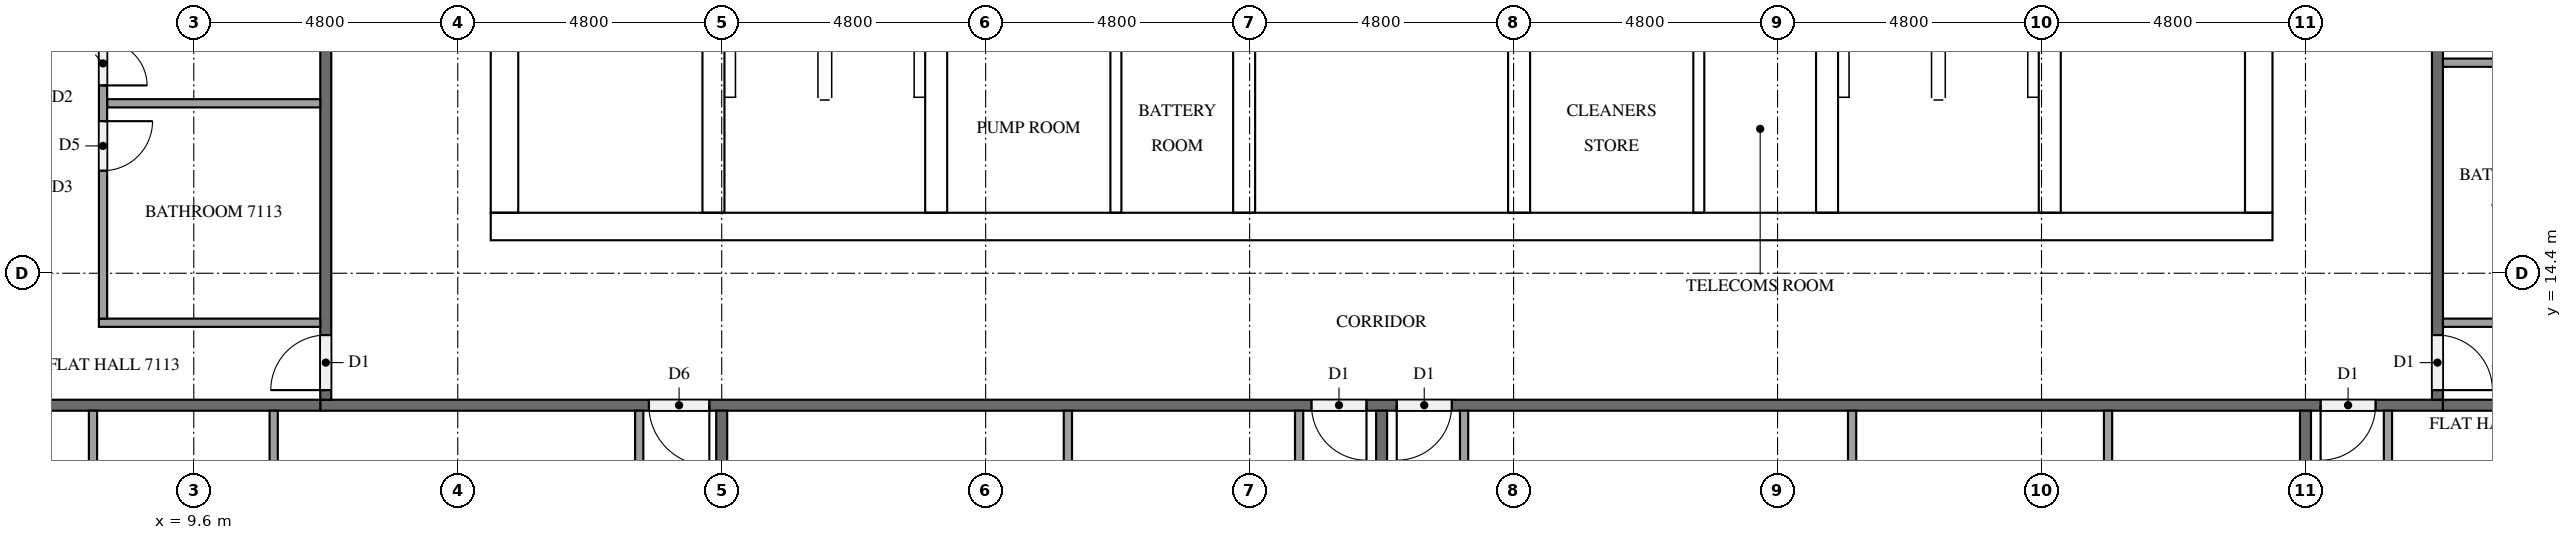
"""IFC4 building model, lengths in metres.
Left out: names, types, materials, properties, quantities, classifications, styles, units other than length and angle.
Written with IfcOpenShell. Run it as: python <this file> out.ifc"""

import sys

from ifc_helpers import new_model, si_unit, direction, frame, frame_2d, origin, place, context, subcontext, project, spatial, rectangle, extrude, element, fill, save


model = new_model("IFC4")
c1 = context("Model", 3, precision=1e-05, world=origin(), true_north=direction((0.0, 1.0)))
c2 = subcontext(c1, "Body", "Model", "MODEL_VIEW")
j1 = project(units=[si_unit("LENGTHUNIT", "METRE"), si_unit("PLANEANGLEUNIT", "RADIAN")], contexts=[c1])
p1 = place(None, origin())
s1 = spatial("IfcSite", under=j1, at=p1, CompositionType="ELEMENT")
p2 = place(p1, origin())
s2 = spatial("IfcBuilding", under=s1, at=p2, CompositionType="ELEMENT")
p3 = place(p2, frame((0.0, 0.0, 272.1)))
s3 = spatial("IfcBuildingStorey", under=s2, at=p3, CompositionType="ELEMENT", Elevation=272.1)
p4 = place(p3, frame((15.0, 15.25, 0.0), z_axis=(0.0, 0.0, 1.0), x_axis=(1.0, 0.0, 0.0)))
e1 = element("IfcWall", 1, at=p4, inside=s3, PredefinedType="SHEAR", context=c2, shape_type="SweptSolid", body=[
    extrude(rectangle(XDim=32.4, YDim=0.5, at=frame_2d((16.2, 0.0))), origin(), (0.0, 0.0, 1.0), 3.2),
])
p5 = place(p4, frame((15.3, 0.0, 0.0)))
e2 = element("IfcOpeningElement", 2, at=p5, cuts=e1, PredefinedType="OPENING", context=c2, shape_type="SweptSolid", body=[
    extrude(rectangle(XDim=1.8, YDim=2.1, at=frame_2d((0.9, 1.05))), frame((0.0, 0.26, 0.0), z_axis=(0.0, -1.0, 0.0), x_axis=(1.0, 0.0, 0.0)), (0.0, 0.0, 1.0), 0.52),
])
p6 = place(p3, frame((15.25, 15.5, 0.0), z_axis=(0.0, 0.0, 1.0), x_axis=(0.0, 1.0, 0.0)))
e3 = element("IfcWall", 3, at=p6, inside=s3, PredefinedType="SHEAR", context=c2, shape_type="SweptSolid", body=[
    extrude(rectangle(XDim=21.8, YDim=0.5, at=frame_2d((10.9, 0.0))), origin(), (0.0, 0.0, 1.0), 3.2),
])
p7 = place(p6, frame((5.26, 0.0, 0.0)))
e4 = element("IfcOpeningElement", 4, at=p7, cuts=e3, PredefinedType="OPENING", context=c2, shape_type="SweptSolid", body=[
    extrude(rectangle(XDim=1.2, YDim=2.1, at=frame_2d((0.6, 1.05))), frame((0.0, 0.26, 0.0), z_axis=(0.0, -1.0, 0.0), x_axis=(1.0, 0.0, 0.0)), (0.0, 0.0, 1.0), 0.52),
])
p8 = place(p3, frame((47.15, 15.5, 0.0), z_axis=(0.0, 0.0, 1.0), x_axis=(0.0, 1.0, 0.0)))
e5 = element("IfcWall", 5, at=p8, inside=s3, PredefinedType="SHEAR", context=c2, shape_type="SweptSolid", body=[
    extrude(rectangle(XDim=21.8, YDim=0.5, at=frame_2d((10.9, 0.0))), origin(), (0.0, 0.0, 1.0), 3.2),
])
p9 = place(p8, frame((10.6, 0.0, 0.0)))
e6 = element("IfcOpeningElement", 6, at=p9, cuts=e5, PredefinedType="OPENING", context=c2, shape_type="SweptSolid", body=[
    extrude(rectangle(XDim=1.2, YDim=2.1, at=frame_2d((0.6, 1.05))), frame((0.0, 0.26, 0.0), z_axis=(0.0, -1.0, 0.0), x_axis=(1.0, 0.0, 0.0)), (0.0, 0.0, 1.0), 0.52),
])
p10 = place(p3, frame((19.05, 15.5, 0.0), z_axis=(0.0, 0.0, 1.0), x_axis=(0.0, 1.0, 0.0)))
e7 = element("IfcWall", 7, at=p10, inside=s3, PredefinedType="SHEAR", context=c2, shape_type="SweptSolid", body=[
    extrude(rectangle(XDim=15.55, YDim=0.4, at=frame_2d((7.775, 0.0))), origin(), (0.0, 0.0, 1.0), 3.2),
])
p11 = place(p10, frame((9.95, 0.0, 0.0)))
e8 = element("IfcOpeningElement", 8, at=p11, cuts=e7, PredefinedType="OPENING", context=c2, shape_type="SweptSolid", body=[
    extrude(rectangle(XDim=1.1, YDim=2.1, at=frame_2d((0.55, 1.05))), frame((0.0, 0.21, 0.0), z_axis=(0.0, -1.0, 0.0), x_axis=(1.0, 0.0, 0.0)), (0.0, 0.0, 1.0), 0.42),
])
p12 = place(p10, frame((13.45, 0.0, 0.0)))
e9 = element("IfcOpeningElement", 9, at=p12, cuts=e7, PredefinedType="OPENING", context=c2, shape_type="SweptSolid", body=[
    extrude(rectangle(XDim=1.1, YDim=2.1, at=frame_2d((0.55, 1.05))), frame((0.0, 0.21, 0.0), z_axis=(0.0, -1.0, 0.0), x_axis=(1.0, 0.0, 0.0)), (0.0, 0.0, 1.0), 0.42),
])
p13 = place(p10, frame((0.7, 0.0, 0.0)))
e10 = element("IfcOpeningElement", 10, at=p13, cuts=e7, PredefinedType="OPENING", context=c2, shape_type="SweptSolid", body=[
    extrude(rectangle(XDim=1.2, YDim=2.1, at=frame_2d((0.6, 1.05))), frame((0.0, 0.21, 0.0), z_axis=(0.0, -1.0, 0.0), x_axis=(1.0, 0.0, 0.0)), (0.0, 0.0, 1.0), 0.42),
])
p14 = place(p3, frame((23.1, 15.5, 0.0), z_axis=(0.0, 0.0, 1.0), x_axis=(0.0, 1.0, 0.0)))
e11 = element("IfcWall", 11, at=p14, inside=s3, PredefinedType="SHEAR", context=c2, shape_type="SweptSolid", body=[
    extrude(rectangle(XDim=21.8, YDim=0.4, at=frame_2d((10.9, 0.0))), origin(), (0.0, 0.0, 1.0), 3.2),
])
p15 = place(p3, frame((39.3, 15.5, 0.0), z_axis=(0.0, 0.0, 1.0), x_axis=(0.0, 1.0, 0.0)))
e12 = element("IfcWall", 12, at=p15, inside=s3, PredefinedType="SHEAR", context=c2, shape_type="SweptSolid", body=[
    extrude(rectangle(XDim=8.75, YDim=0.4, at=frame_2d((4.375, 0.0))), origin(), (0.0, 0.0, 1.0), 3.2),
])
p16 = place(p3, frame((43.35, 15.5, 0.0), z_axis=(0.0, 0.0, 1.0), x_axis=(0.0, 1.0, 0.0)))
e13 = element("IfcWall", 13, at=p16, inside=s3, PredefinedType="SHEAR", context=c2, shape_type="SweptSolid", body=[
    extrude(rectangle(XDim=8.75, YDim=0.4, at=frame_2d((4.375, 0.0))), origin(), (0.0, 0.0, 1.0), 3.2),
])
p17 = place(p16, frame((0.7, 0.0, 0.0)))
e14 = element("IfcOpeningElement", 14, at=p17, cuts=e13, PredefinedType="OPENING", context=c2, shape_type="SweptSolid", body=[
    extrude(rectangle(XDim=1.2, YDim=2.1, at=frame_2d((0.6, 1.05))), frame((0.0, 0.21, 0.0), z_axis=(0.0, -1.0, 0.0), x_axis=(1.0, 0.0, 0.0)), (0.0, 0.0, 1.0), 0.42),
])
for number, where, z_axis, x_axis in (
    (15, (28.7, 15.5, 0.0), (0.0, 0.0, 1.0), (0.0, 1.0, 0.0)),
    (16, (33.7, 15.5, 0.0), (0.0, 0.0, 1.0), (0.0, 1.0, 0.0)),
):
    element("IfcWall", number, at=place(p3, frame(where, z_axis=z_axis, x_axis=x_axis)), inside=s3, PredefinedType="SHEAR", context=c2, shape_type="SweptSolid", body=[
        extrude(rectangle(XDim=3.05, YDim=0.4, at=frame_2d((1.525, 0.0))), origin(), (0.0, 0.0, 1.0), 3.2),
    ])
for number, where, z_axis, x_axis in (
    (17, (26.368, 15.5, 0.0), (0.0, 0.0, 1.0), (0.0, 1.0, 0.0)),
    (18, (36.968, 15.5, 0.0), (0.0, 0.0, 1.0), (0.0, 1.0, 0.0)),
):
    element("IfcWall", number, at=place(p3, frame(where, z_axis=z_axis, x_axis=x_axis)), inside=s3, PredefinedType="PARTITIONING", context=c2, shape_type="SweptSolid", body=[
        extrude(rectangle(XDim=3.05, YDim=0.2, at=frame_2d((1.525, 0.0))), origin(), (0.0, 0.0, 1.0), 3.2),
    ])
p18 = place(p3, frame((50.5, 12.0, 0.0), z_axis=(0.0, 0.0, 1.0), x_axis=(-1.0, 0.0, 0.0)))
e19 = element("IfcWall", 19, at=p18, inside=s3, PredefinedType="PARTITIONING", context=c2, shape_type="SweptSolid", body=[
    extrude(rectangle(XDim=38.6, YDim=0.2, at=frame_2d((19.3, 0.0))), origin(), (0.0, 0.0, 1.0), 3.2),
])
p19 = place(p18, frame((31.525, 0.0, 0.0)))
e20 = element("IfcOpeningElement", 20, at=p19, cuts=e19, PredefinedType="OPENING", context=c2, shape_type="SweptSolid", body=[
    extrude(rectangle(XDim=1.1, YDim=2.1, at=frame_2d((0.55, 1.05))), frame((0.0, 0.11, 0.0), z_axis=(0.0, -1.0, 0.0), x_axis=(1.0, 0.0, 0.0)), (0.0, 0.0, 1.0), 0.22),
])
p20 = place(p18, frame((19.575, 0.0, 0.0)))
e21 = element("IfcOpeningElement", 21, at=p20, cuts=e19, PredefinedType="OPENING", context=c2, shape_type="SweptSolid", body=[
    extrude(rectangle(XDim=1.0, YDim=2.1, at=frame_2d((0.5, 1.05))), frame((0.0, 0.11, 0.0), z_axis=(0.0, -1.0, 0.0), x_axis=(1.0, 0.0, 0.0)), (0.0, 0.0, 1.0), 0.22),
])
p21 = place(p18, frame((18.025, 0.0, 0.0)))
e22 = element("IfcOpeningElement", 22, at=p21, cuts=e19, PredefinedType="OPENING", context=c2, shape_type="SweptSolid", body=[
    extrude(rectangle(XDim=1.0, YDim=2.1, at=frame_2d((0.5, 1.05))), frame((0.0, 0.11, 0.0), z_axis=(0.0, -1.0, 0.0), x_axis=(1.0, 0.0, 0.0)), (0.0, 0.0, 1.0), 0.22),
])
p22 = place(p18, frame((1.225, 0.0, 0.0)))
e23 = element("IfcOpeningElement", 23, at=p22, cuts=e19, PredefinedType="OPENING", context=c2, shape_type="SweptSolid", body=[
    extrude(rectangle(XDim=1.0, YDim=2.1, at=frame_2d((0.5, 1.05))), frame((0.0, 0.11, 0.0), z_axis=(0.0, -1.0, 0.0), x_axis=(1.0, 0.0, 0.0)), (0.0, 0.0, 1.0), 0.22),
])
p23 = place(p3, frame((50.4, 40.7, 0.0), z_axis=(0.0, 0.0, 1.0), x_axis=(0.0, -1.0, 0.0)))
e24 = element("IfcWall", 24, at=p23, inside=s3, PredefinedType="PARTITIONING", context=c2, shape_type="SweptSolid", body=[
    extrude(rectangle(XDim=28.6, YDim=0.2, at=frame_2d((14.3, 0.0))), origin(), (0.0, 0.0, 1.0), 3.2),
])
p24 = place(p23, frame((27.425, 0.0, 0.0)))
e25 = element("IfcOpeningElement", 25, at=p24, cuts=e24, PredefinedType="OPENING", context=c2, shape_type="SweptSolid", body=[
    extrude(rectangle(XDim=1.0, YDim=2.1, at=frame_2d((0.5, 1.05))), frame((0.0, 0.11, 0.0), z_axis=(0.0, -1.0, 0.0), x_axis=(1.0, 0.0, 0.0)), (0.0, 0.0, 1.0), 0.22),
])
p25 = place(p23, frame((0.175, 0.0, 0.0)))
e26 = element("IfcOpeningElement", 26, at=p25, cuts=e24, PredefinedType="OPENING", context=c2, shape_type="SweptSolid", body=[
    extrude(rectangle(XDim=1.0, YDim=2.1, at=frame_2d((0.5, 1.05))), frame((0.0, 0.11, 0.0), z_axis=(0.0, -1.0, 0.0), x_axis=(1.0, 0.0, 0.0)), (0.0, 0.0, 1.0), 0.22),
])
p26 = place(p3, frame((12.0, 12.1, 0.0), z_axis=(0.0, 0.0, 1.0), x_axis=(0.0, 1.0, 0.0)))
e27 = element("IfcWall", 27, at=p26, inside=s3, PredefinedType="PARTITIONING", context=c2, shape_type="SweptSolid", body=[
    extrude(rectangle(XDim=28.6, YDim=0.2, at=frame_2d((14.3, 0.0))), origin(), (0.0, 0.0, 1.0), 3.2),
])
p27 = place(p26, frame((24.175, 0.0, 0.0)))
e28 = element("IfcOpeningElement", 28, at=p27, cuts=e27, PredefinedType="OPENING", context=c2, shape_type="SweptSolid", body=[
    extrude(rectangle(XDim=1.0, YDim=2.1, at=frame_2d((0.5, 1.05))), frame((0.0, 0.11, 0.0), z_axis=(0.0, -1.0, 0.0), x_axis=(1.0, 0.0, 0.0)), (0.0, 0.0, 1.0), 0.22),
])
p28 = place(p26, frame((14.575, 0.0, 0.0)))
e29 = element("IfcOpeningElement", 29, at=p28, cuts=e27, PredefinedType="OPENING", context=c2, shape_type="SweptSolid", body=[
    extrude(rectangle(XDim=1.0, YDim=2.1, at=frame_2d((0.5, 1.05))), frame((0.0, 0.11, 0.0), z_axis=(0.0, -1.0, 0.0), x_axis=(1.0, 0.0, 0.0)), (0.0, 0.0, 1.0), 0.22),
])
p29 = place(p26, frame((0.175, 0.0, 0.0)))
e30 = element("IfcOpeningElement", 30, at=p29, cuts=e27, PredefinedType="OPENING", context=c2, shape_type="SweptSolid", body=[
    extrude(rectangle(XDim=1.0, YDim=2.1, at=frame_2d((0.5, 1.05))), frame((0.0, 0.11, 0.0), z_axis=(0.0, -1.0, 0.0), x_axis=(1.0, 0.0, 0.0)), (0.0, 0.0, 1.0), 0.22),
])
for number, where, z_axis, x_axis in (
    (31, (19.2, 11.9, 0.0), (0.0, 0.0, 1.0), (0.0, -1.0, 0.0)),
    (32, (0.1, 12.0, 0.0), (0.0, 0.0, 1.0), (1.0, 0.0, 0.0)),
    (33, (31.2, 11.9, 0.0), (0.0, 0.0, 1.0), (0.0, -1.0, 0.0)),
    (34, (48.0, 11.9, 0.0), (0.0, 0.0, 1.0), (0.0, -1.0, 0.0)),
):
    element("IfcWall", number, at=place(p3, frame(where, z_axis=z_axis, x_axis=x_axis)), inside=s3, PredefinedType="PARTITIONING", context=c2, shape_type="SweptSolid", body=[
        extrude(rectangle(XDim=11.8, YDim=0.2, at=frame_2d((5.9, 0.0))), origin(), (0.0, 0.0, 1.0), 3.2),
    ])
p30 = place(p3, frame((50.5, 12.0, 0.0), z_axis=(0.0, 0.0, 1.0), x_axis=(1.0, 0.0, 0.0)))
e35 = element("IfcWall", 35, at=p30, inside=s3, PredefinedType="PARTITIONING", context=c2, shape_type="SweptSolid", body=[
    extrude(rectangle(XDim=7.0, YDim=0.2, at=frame_2d((3.5, 0.0))), origin(), (0.0, 0.0, 1.0), 3.2),
])
for number, where, z_axis, x_axis in (
    (36, (11.053, 11.9, 0.0), (0.0, 0.0, 1.0), (0.0, -1.0, 0.0)),
    (37, (7.767, 11.9, 0.0), (0.0, 0.0, 1.0), (0.0, -1.0, 0.0)),
):
    element("IfcWall", number, at=place(p3, frame(where, z_axis=z_axis, x_axis=x_axis)), inside=s3, PredefinedType="PARTITIONING", context=c2, shape_type="SweptSolid", body=[
        extrude(rectangle(XDim=2.975, YDim=0.15, at=frame_2d((1.487, 0.0))), origin(), (0.0, 0.0, 1.0), 3.2),
    ])
p31 = place(p3, frame((17.7, 11.9, 0.0), z_axis=(0.0, 0.0, 1.0), x_axis=(0.0, -1.0, 0.0)))
e38 = element("IfcWall", 38, at=p31, inside=s3, PredefinedType="PARTITIONING", context=c2, shape_type="SweptSolid", body=[
    extrude(rectangle(XDim=3.125, YDim=0.15, at=frame_2d((1.562, 0.0))), origin(), (0.0, 0.0, 1.0), 3.2),
])
p32 = place(p3, frame((25.495, 11.9, 0.0), z_axis=(0.0, 0.0, 1.0), x_axis=(0.0, -1.0, 0.0)))
e39 = element("IfcWall", 39, at=p32, inside=s3, PredefinedType="PARTITIONING", context=c2, shape_type="SweptSolid", body=[
    extrude(rectangle(XDim=2.975, YDim=0.15, at=frame_2d((1.487, 0.0))), origin(), (0.0, 0.0, 1.0), 3.2),
])
p33 = place(p3, frame((29.7, 11.9, 0.0), z_axis=(0.0, 0.0, 1.0), x_axis=(0.0, -1.0, 0.0)))
e40 = element("IfcWall", 40, at=p33, inside=s3, PredefinedType="PARTITIONING", context=c2, shape_type="SweptSolid", body=[
    extrude(rectangle(XDim=3.125, YDim=0.15, at=frame_2d((1.562, 0.0))), origin(), (0.0, 0.0, 1.0), 3.2),
])
for number, where, z_axis, x_axis in (
    (41, (39.756, 11.9, 0.0), (0.0, 0.0, 1.0), (0.0, -1.0, 0.0)),
    (42, (44.41, 11.9, 0.0), (0.0, 0.0, 1.0), (0.0, -1.0, 0.0)),
):
    element("IfcWall", number, at=place(p3, frame(where, z_axis=z_axis, x_axis=x_axis)), inside=s3, PredefinedType="PARTITIONING", context=c2, shape_type="SweptSolid", body=[
        extrude(rectangle(XDim=3.725, YDim=0.15, at=frame_2d((1.862, 0.0))), origin(), (0.0, 0.0, 1.0), 3.2),
    ])
p34 = place(p3, frame((32.7, 11.9, 0.0), z_axis=(0.0, 0.0, 1.0), x_axis=(0.0, -1.0, 0.0)))
e43 = element("IfcWall", 43, at=p34, inside=s3, PredefinedType="PARTITIONING", context=c2, shape_type="SweptSolid", body=[
    extrude(rectangle(XDim=3.875, YDim=0.15, at=frame_2d((1.938, 0.0))), origin(), (0.0, 0.0, 1.0), 3.2),
])
p35 = place(p3, frame((49.5, 11.9, 0.0), z_axis=(0.0, 0.0, 1.0), x_axis=(0.0, -1.0, 0.0)))
e44 = element("IfcWall", 44, at=p35, inside=s3, PredefinedType="PARTITIONING", context=c2, shape_type="SweptSolid", body=[
    extrude(rectangle(XDim=3.125, YDim=0.15, at=frame_2d((1.562, 0.0))), origin(), (0.0, 0.0, 1.0), 3.2),
])
p36 = place(p3, frame((50.5, 18.229, 0.0), z_axis=(0.0, 0.0, 1.0), x_axis=(1.0, 0.0, 0.0)))
e45 = element("IfcWall", 45, at=p36, inside=s3, PredefinedType="PARTITIONING", context=c2, shape_type="SweptSolid", body=[
    extrude(rectangle(XDim=2.375, YDim=0.15, at=frame_2d((1.188, 0.0))), origin(), (0.0, 0.0, 1.0), 3.2),
])
p37 = place(p3, frame((50.5, 13.5, 0.0), z_axis=(0.0, 0.0, 1.0), x_axis=(1.0, 0.0, 0.0)))
e46 = element("IfcWall", 46, at=p37, inside=s3, PredefinedType="PARTITIONING", context=c2, shape_type="SweptSolid", body=[
    extrude(rectangle(XDim=2.525, YDim=0.15, at=frame_2d((1.262, 0.0))), origin(), (0.0, 0.0, 1.0), 3.2),
])
p38 = place(p3, frame((11.9, 17.49, 0.0), z_axis=(0.0, 0.0, 1.0), x_axis=(-1.0, 0.0, 0.0)))
e47 = element("IfcWall", 47, at=p38, inside=s3, PredefinedType="PARTITIONING", context=c2, shape_type="SweptSolid", body=[
    extrude(rectangle(XDim=3.875, YDim=0.15, at=frame_2d((1.938, 0.0))), origin(), (0.0, 0.0, 1.0), 3.2),
])
p39 = place(p3, frame((11.9, 13.5, 0.0), z_axis=(0.0, 0.0, 1.0), x_axis=(-1.0, 0.0, 0.0)))
e48 = element("IfcWall", 48, at=p39, inside=s3, PredefinedType="PARTITIONING", context=c2, shape_type="SweptSolid", body=[
    extrude(rectangle(XDim=4.025, YDim=0.15, at=frame_2d((2.012, 0.0))), origin(), (0.0, 0.0, 1.0), 3.2),
])
p40 = place(p3, frame((7.95, 26.3, 0.0), z_axis=(0.0, 0.0, 1.0), x_axis=(0.0, -1.0, 0.0)))
e49 = element("IfcWall", 49, at=p40, inside=s3, PredefinedType="PARTITIONING", context=c2, shape_type="SweptSolid", body=[
    extrude(rectangle(XDim=12.725, YDim=0.15, at=frame_2d((6.363, 0.0))), origin(), (0.0, 0.0, 1.0), 3.2),
])
p41 = place(p40, frame((9.135, 0.0, 0.0)))
e50 = element("IfcOpeningElement", 50, at=p41, cuts=e49, PredefinedType="OPENING", context=c2, shape_type="SweptSolid", body=[
    extrude(rectangle(XDim=0.9, YDim=2.1, at=frame_2d((0.45, 1.05))), frame((0.0, 0.085, 0.0), z_axis=(0.0, -1.0, 0.0), x_axis=(1.0, 0.0, 0.0)), (0.0, 0.0, 1.0), 0.17),
])
p42 = place(p40, frame((7.685, 0.0, 0.0)))
e51 = element("IfcOpeningElement", 51, at=p42, cuts=e49, PredefinedType="OPENING", context=c2, shape_type="SweptSolid", body=[
    extrude(rectangle(XDim=0.8, YDim=2.1, at=frame_2d((0.4, 1.05))), frame((0.0, 0.085, 0.0), z_axis=(0.0, -1.0, 0.0), x_axis=(1.0, 0.0, 0.0)), (0.0, 0.0, 1.0), 0.17),
])
p43 = place(p40, frame((0.35, 0.0, 0.0)))
e52 = element("IfcOpeningElement", 52, at=p43, cuts=e49, PredefinedType="OPENING", context=c2, shape_type="SweptSolid", body=[
    extrude(rectangle(XDim=0.9, YDim=2.1, at=frame_2d((0.45, 1.05))), frame((0.0, 0.085, 0.0), z_axis=(0.0, -1.0, 0.0), x_axis=(1.0, 0.0, 0.0)), (0.0, 0.0, 1.0), 0.17),
])
p44 = place(p13, frame((1.2, 0.0, 0.0), z_axis=(0.0, 0.0, 1.0), x_axis=(-1.0, 0.0, 0.0)))
e53 = element("IfcDoor", 53, at=p44, inside=s3, OperationType="SINGLE_SWING_LEFT", PredefinedType="DOOR", context=c2, shape_type="SweptSolid", body=[
    extrude(rectangle(XDim=1.2, YDim=2.1, at=frame_2d((0.6, 1.05))), frame((0.0, 0.025, 0.0), z_axis=(0.0, -1.0, 0.0), x_axis=(1.0, 0.0, 0.0)), (0.0, 0.0, 1.0), 0.05),
])
fill(e10, e53)
p45 = place(p17, origin())
e54 = element("IfcDoor", 54, at=p45, inside=s3, OperationType="SINGLE_SWING_RIGHT", PredefinedType="DOOR", context=c2, shape_type="SweptSolid", body=[
    extrude(rectangle(XDim=1.2, YDim=2.1, at=frame_2d((0.6, 1.05))), frame((0.0, 0.025, 0.0), z_axis=(0.0, -1.0, 0.0), x_axis=(1.0, 0.0, 0.0)), (0.0, 0.0, 1.0), 0.05),
])
fill(e14, e54)
p46 = place(p5, frame((1.8, 0.0, 0.0), z_axis=(0.0, 0.0, 1.0), x_axis=(-1.0, 0.0, 0.0)))
e55 = element("IfcDoor", 55, at=p46, inside=s3, OperationType="DOUBLE_DOOR_SINGLE_SWING", PredefinedType="DOOR", context=c2, shape_type="SweptSolid", body=[
    extrude(rectangle(XDim=1.8, YDim=2.1, at=frame_2d((0.9, 1.05))), frame((0.0, 0.025, 0.0), z_axis=(0.0, -1.0, 0.0), x_axis=(1.0, 0.0, 0.0)), (0.0, 0.0, 1.0), 0.05),
])
fill(e2, e55)
p47 = place(p19, origin())
e56 = element("IfcDoor", 56, at=p47, inside=s3, OperationType="SINGLE_SWING_LEFT", PredefinedType="DOOR", context=c2, shape_type="SweptSolid", body=[
    extrude(rectangle(XDim=1.1, YDim=2.1, at=frame_2d((0.55, 1.05))), frame((0.0, 0.025, 0.0), z_axis=(0.0, -1.0, 0.0), x_axis=(1.0, 0.0, 0.0)), (0.0, 0.0, 1.0), 0.05),
])
fill(e20, e56)
p48 = place(p20, origin())
e57 = element("IfcDoor", 57, at=p48, inside=s3, OperationType="SINGLE_SWING_LEFT", PredefinedType="DOOR", context=c2, shape_type="SweptSolid", body=[
    extrude(rectangle(XDim=1.0, YDim=2.1, at=frame_2d((0.5, 1.05))), frame((0.0, 0.025, 0.0), z_axis=(0.0, -1.0, 0.0), x_axis=(1.0, 0.0, 0.0)), (0.0, 0.0, 1.0), 0.05),
])
fill(e21, e57)
p49 = place(p21, origin())
e58 = element("IfcDoor", 58, at=p49, inside=s3, OperationType="SINGLE_SWING_RIGHT", PredefinedType="DOOR", context=c2, shape_type="SweptSolid", body=[
    extrude(rectangle(XDim=1.0, YDim=2.1, at=frame_2d((0.5, 1.05))), frame((0.0, 0.025, 0.0), z_axis=(0.0, -1.0, 0.0), x_axis=(1.0, 0.0, 0.0)), (0.0, 0.0, 1.0), 0.05),
])
fill(e22, e58)
p50 = place(p22, origin())
e59 = element("IfcDoor", 59, at=p50, inside=s3, OperationType="SINGLE_SWING_RIGHT", PredefinedType="DOOR", context=c2, shape_type="SweptSolid", body=[
    extrude(rectangle(XDim=1.0, YDim=2.1, at=frame_2d((0.5, 1.05))), frame((0.0, 0.025, 0.0), z_axis=(0.0, -1.0, 0.0), x_axis=(1.0, 0.0, 0.0)), (0.0, 0.0, 1.0), 0.05),
])
fill(e23, e59)
p51 = place(p24, origin())
e60 = element("IfcDoor", 60, at=p51, inside=s3, OperationType="SINGLE_SWING_RIGHT", PredefinedType="DOOR", context=c2, shape_type="SweptSolid", body=[
    extrude(rectangle(XDim=1.0, YDim=2.1, at=frame_2d((0.5, 1.05))), frame((0.0, 0.025, 0.0), z_axis=(0.0, -1.0, 0.0), x_axis=(1.0, 0.0, 0.0)), (0.0, 0.0, 1.0), 0.05),
])
fill(e25, e60)
p52 = place(p29, origin())
e61 = element("IfcDoor", 61, at=p52, inside=s3, OperationType="SINGLE_SWING_LEFT", PredefinedType="DOOR", context=c2, shape_type="SweptSolid", body=[
    extrude(rectangle(XDim=1.0, YDim=2.1, at=frame_2d((0.5, 1.05))), frame((0.0, 0.025, 0.0), z_axis=(0.0, -1.0, 0.0), x_axis=(1.0, 0.0, 0.0)), (0.0, 0.0, 1.0), 0.05),
])
fill(e30, e61)
p53 = place(p41, origin())
e62 = element("IfcDoor", 62, at=p53, inside=s3, OperationType="SINGLE_SWING_LEFT", PredefinedType="DOOR", context=c2, shape_type="SweptSolid", body=[
    extrude(rectangle(XDim=0.9, YDim=2.1, at=frame_2d((0.45, 1.05))), frame((0.0, 0.025, 0.0), z_axis=(0.0, -1.0, 0.0), x_axis=(1.0, 0.0, 0.0)), (0.0, 0.0, 1.0), 0.05),
])
fill(e50, e62)
p54 = place(p42, origin())
e63 = element("IfcDoor", 63, at=p54, inside=s3, OperationType="SINGLE_SWING_RIGHT", PredefinedType="DOOR", context=c2, shape_type="SweptSolid", body=[
    extrude(rectangle(XDim=0.8, YDim=2.1, at=frame_2d((0.4, 1.05))), frame((0.0, 0.025, 0.0), z_axis=(0.0, -1.0, 0.0), x_axis=(1.0, 0.0, 0.0)), (0.0, 0.0, 1.0), 0.05),
])
fill(e51, e63)
save(model, sys.argv[1])
